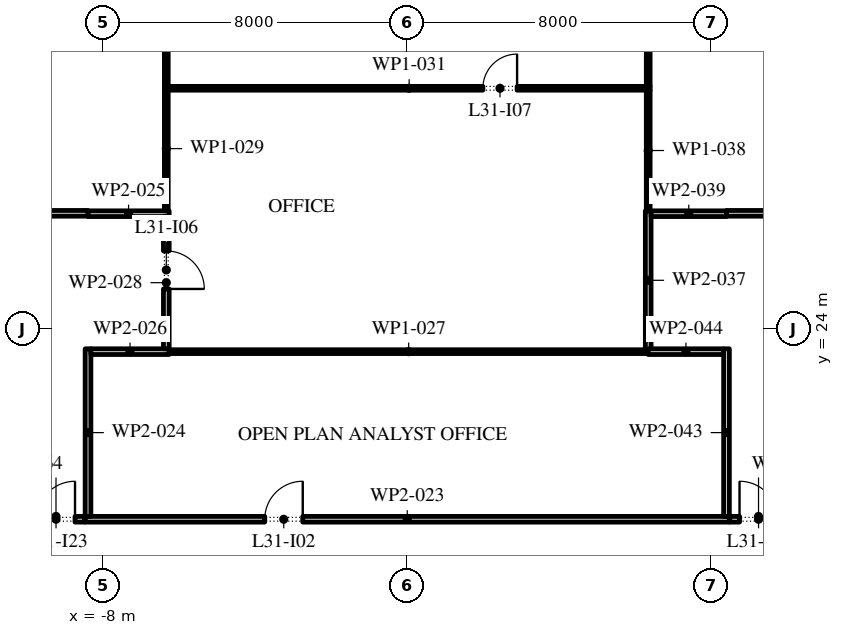
"""IFC4 building model, lengths in metres.
Left out: names, types, materials, properties, quantities, classifications, styles, units other than length and angle.
Written with IfcOpenShell. Run it as: python <this file> out.ifc"""

import sys

from ifc_helpers import new_model, si_unit, direction, frame, frame_2d, origin, place, context, subcontext, project, spatial, rectangle, extrude, element, fill, save


model = new_model("IFC4")
c1 = context("Model", 3, precision=1e-05, world=origin(), true_north=direction((0.0, 1.0)))
c2 = subcontext(c1, "Body", "Model", "MODEL_VIEW")
j1 = project(units=[si_unit("LENGTHUNIT", "METRE"), si_unit("PLANEANGLEUNIT", "RADIAN")], contexts=[c1])
p1 = place(None, origin())
s1 = spatial("IfcSite", under=j1, at=p1, CompositionType="ELEMENT")
p2 = place(p1, origin())
s2 = spatial("IfcBuilding", under=s1, at=p2, CompositionType="ELEMENT")
p3 = place(p2, frame((0.0, 0.0, 143.4)))
s3 = spatial("IfcBuildingStorey", under=s2, at=p3, CompositionType="ELEMENT", Elevation=143.4)
p4 = place(p3, frame((31.078, 28.421, 0.0), z_axis=(0.0, 0.0, 1.0), x_axis=(-0.974370456532, 0.224949357493, 0.0)))
e1 = element("IfcWall", 1, at=p4, inside=s3, PredefinedType="STANDARD", context=c2, shape_type="SweptSolid", body=[
    extrude(rectangle(XDim=51.0, YDim=0.3, at=frame_2d((25.5, 0.0))), origin(), (0.0, 0.0, 1.0), 4.0),
])
p5 = place(p4, frame((1.875, 0.0, 0.45)))
e2 = element("IfcOpeningElement", 2, at=p5, cuts=e1, PredefinedType="OPENING", context=c2, shape_type="SweptSolid", body=[
    extrude(rectangle(XDim=4.5, YDim=2.875, at=frame_2d((2.25, 1.438))), frame((0.0, 0.16, 0.0), z_axis=(0.0, -1.0, 0.0), x_axis=(1.0, 0.0, 0.0)), (0.0, 0.0, 1.0), 0.32),
])
p6 = place(p4, frame((10.275, 0.0, 0.45)))
e3 = element("IfcOpeningElement", 3, at=p6, cuts=e1, PredefinedType="OPENING", context=c2, shape_type="SweptSolid", body=[
    extrude(rectangle(XDim=4.5, YDim=2.8, at=frame_2d((2.25, 1.4))), frame((0.0, 0.16, 0.0), z_axis=(0.0, -1.0, 0.0), x_axis=(1.0, 0.0, 0.0)), (0.0, 0.0, 1.0), 0.32),
])
p7 = place(p4, frame((18.825, 0.0, 0.45)))
e4 = element("IfcOpeningElement", 4, at=p7, cuts=e1, PredefinedType="OPENING", context=c2, shape_type="SweptSolid", body=[
    extrude(rectangle(XDim=4.5, YDim=2.75, at=frame_2d((2.25, 1.375))), frame((0.0, 0.16, 0.0), z_axis=(0.0, -1.0, 0.0), x_axis=(1.0, 0.0, 0.0)), (0.0, 0.0, 1.0), 0.32),
])
p8 = place(p4, frame((28.425, 0.0, 0.0)))
e5 = element("IfcOpeningElement", 5, at=p8, cuts=e1, PredefinedType="OPENING", context=c2, shape_type="SweptSolid", body=[
    extrude(rectangle(XDim=2.4, YDim=3.025, at=frame_2d((1.2, 1.512))), frame((0.0, 0.16, 0.0), z_axis=(0.0, -1.0, 0.0), x_axis=(1.0, 0.0, 0.0)), (0.0, 0.0, 1.0), 0.32),
])
p9 = place(p4, frame((35.925, 0.0, 0.45)))
e6 = element("IfcOpeningElement", 6, at=p9, cuts=e1, PredefinedType="OPENING", context=c2, shape_type="SweptSolid", body=[
    extrude(rectangle(XDim=4.5, YDim=2.525, at=frame_2d((2.25, 1.262))), frame((0.0, 0.16, 0.0), z_axis=(0.0, -1.0, 0.0), x_axis=(1.0, 0.0, 0.0)), (0.0, 0.0, 1.0), 0.32),
])
p10 = place(p4, frame((44.475, 0.0, 0.45)))
e7 = element("IfcOpeningElement", 7, at=p10, cuts=e1, PredefinedType="OPENING", context=c2, shape_type="SweptSolid", body=[
    extrude(rectangle(XDim=4.5, YDim=2.45, at=frame_2d((2.25, 1.225))), frame((0.0, 0.16, 0.0), z_axis=(0.0, -1.0, 0.0), x_axis=(1.0, 0.0, 0.0)), (0.0, 0.0, 1.0), 0.32),
])
p11 = place(p3, frame((-18.65, 27.05, 0.0), z_axis=(0.0, 0.0, 1.0), x_axis=(1.0, 0.0, 0.0)))
e8 = element("IfcWall", 8, at=p11, inside=s3, PredefinedType="PARTITIONING", context=c2, shape_type="SweptSolid", body=[
    extrude(rectangle(XDim=10.25, YDim=0.15, at=frame_2d((5.125, 0.0))), origin(), (0.0, 0.0, 1.0), 4.0),
])
p12 = place(p11, frame((3.6, 0.0, 0.0)))
e9 = element("IfcOpeningElement", 9, at=p12, cuts=e8, PredefinedType="OPENING", context=c2, shape_type="SweptSolid", body=[
    extrude(rectangle(XDim=1.0, YDim=2.1, at=frame_2d((0.5, 1.05))), frame((0.0, 0.085, 0.0), z_axis=(0.0, -1.0, 0.0), x_axis=(1.0, 0.0, 0.0)), (0.0, 0.0, 1.0), 0.17),
])
p13 = place(p3, frame((-8.475, 19.0, 0.0), z_axis=(0.0, 0.0, 1.0), x_axis=(1.0, 0.0, 0.0)))
e10 = element("IfcWall", 10, at=p13, inside=s3, PredefinedType="PARTITIONING", context=c2, shape_type="SweptSolid", body=[
    extrude(rectangle(XDim=16.95, YDim=0.15, at=frame_2d((8.475, 0.0))), origin(), (0.0, 0.0, 1.0), 4.0),
])
p14 = place(p13, frame((4.725, 0.0, 0.0)))
e11 = element("IfcOpeningElement", 11, at=p14, cuts=e10, PredefinedType="OPENING", context=c2, shape_type="SweptSolid", body=[
    extrude(rectangle(XDim=1.0, YDim=2.1, at=frame_2d((0.5, 1.05))), frame((0.0, 0.085, 0.0), z_axis=(0.0, -1.0, 0.0), x_axis=(1.0, 0.0, 0.0)), (0.0, 0.0, 1.0), 0.17),
])
p15 = place(p3, frame((-8.4, 23.485, 0.0), z_axis=(0.0, 0.0, 1.0), x_axis=(0.0, -1.0, 0.0)))
e12 = element("IfcWall", 12, at=p15, inside=s3, PredefinedType="PARTITIONING", context=c2, shape_type="SweptSolid", body=[
    extrude(rectangle(XDim=4.41, YDim=0.15, at=frame_2d((2.205, 0.0))), origin(), (0.0, 0.0, 1.0), 4.0),
])
p16 = place(p3, frame((-8.4, 27.04, 0.0), z_axis=(0.0, 0.0, 1.0), x_axis=(1.0, 0.0, 0.0)))
e13 = element("IfcWall", 13, at=p16, inside=s3, PredefinedType="PARTITIONING", context=c2, shape_type="SweptSolid", body=[
    extrude(rectangle(XDim=2.135, YDim=0.15, at=frame_2d((1.067, 0.0))), origin(), (0.0, 0.0, 1.0), 4.0),
])
p17 = place(p3, frame((-6.265, 23.41, 0.0), z_axis=(0.0, 0.0, 1.0), x_axis=(-1.0, 0.0, 0.0)))
e14 = element("IfcWall", 14, at=p17, inside=s3, PredefinedType="PARTITIONING", context=c2, shape_type="SweptSolid", body=[
    extrude(rectangle(XDim=2.06, YDim=0.15, at=frame_2d((1.03, 0.0))), origin(), (0.0, 0.0, 1.0), 4.0),
])
p18 = place(p3, frame((-6.265, 23.41, 0.0), z_axis=(0.0, 0.0, 1.0), x_axis=(1.0, 0.0, 0.0)))
e15 = element("IfcWall", 15, at=p18, inside=s3, PredefinedType="PARTITIONING", context=c2, shape_type="SweptSolid", body=[
    extrude(rectangle(XDim=12.605, YDim=0.1, at=frame_2d((6.302, 0.0))), origin(), (0.0, 0.0, 1.0), 4.0),
])
p19 = place(p3, frame((-6.34, 26.965, 0.0), z_axis=(0.0, 0.0, 1.0), x_axis=(0.0, -1.0, 0.0)))
e16 = element("IfcWall", 16, at=p19, inside=s3, PredefinedType="PARTITIONING", context=c2, shape_type="SweptSolid", body=[
    extrude(rectangle(XDim=3.48, YDim=0.15, at=frame_2d((1.74, 0.0))), origin(), (0.0, 0.0, 1.0), 4.0),
])
p20 = place(p19, frame((0.905, 0.0, 0.0)))
e17 = element("IfcOpeningElement", 17, at=p20, cuts=e16, PredefinedType="OPENING", context=c2, shape_type="SweptSolid", body=[
    extrude(rectangle(XDim=1.0, YDim=2.1, at=frame_2d((0.5, 1.05))), frame((0.0, 0.085, 0.0), z_axis=(0.0, -1.0, 0.0), x_axis=(1.0, 0.0, 0.0)), (0.0, 0.0, 1.0), 0.17),
])
p21 = place(p3, frame((-6.34, 27.115, 0.0), z_axis=(0.0, 0.0, 1.0), x_axis=(0.0, 1.0, 0.0)))
e18 = element("IfcWall", 18, at=p21, inside=s3, PredefinedType="PARTITIONING", context=c2, shape_type="SweptSolid", body=[
    extrude(rectangle(XDim=3.275, YDim=0.1, at=frame_2d((1.637, 0.0))), origin(), (0.0, 0.0, 1.0), 4.0),
])
p22 = place(p3, frame((-6.34, 30.39, 0.0), z_axis=(0.0, 0.0, 1.0), x_axis=(0.0, 1.0, 0.0)))
e19 = element("IfcWall", 19, at=p22, inside=s3, PredefinedType="PARTITIONING", context=c2, shape_type="SweptSolid", body=[
    extrude(rectangle(XDim=3.06, YDim=0.1, at=frame_2d((1.53, 0.0))), origin(), (0.0, 0.0, 1.0), 4.0),
])
p23 = place(p3, frame((-6.29, 30.34, 0.0), z_axis=(0.0, 0.0, 1.0), x_axis=(1.0, 0.0, 0.0)))
e20 = element("IfcWall", 20, at=p23, inside=s3, PredefinedType="PARTITIONING", context=c2, shape_type="SweptSolid", body=[
    extrude(rectangle(XDim=12.68, YDim=0.1, at=frame_2d((6.34, 0.0))), origin(), (0.0, 0.0, 1.0), 4.0),
])
p24 = place(p23, frame((8.28, 0.0, 0.0)))
e21 = element("IfcOpeningElement", 21, at=p24, cuts=e20, PredefinedType="OPENING", context=c2, shape_type="SweptSolid", body=[
    extrude(rectangle(XDim=0.9, YDim=2.1, at=frame_2d((0.45, 1.05))), frame((0.0, 0.06, 0.0), z_axis=(0.0, -1.0, 0.0), x_axis=(1.0, 0.0, 0.0)), (0.0, 0.0, 1.0), 0.12),
])
p25 = place(p3, frame((6.34, 23.46, 0.0), z_axis=(0.0, 0.0, 1.0), x_axis=(0.0, 1.0, 0.0)))
e22 = element("IfcWall", 22, at=p25, inside=s3, PredefinedType="PARTITIONING", context=c2, shape_type="SweptSolid", body=[
    extrude(rectangle(XDim=3.655, YDim=0.15, at=frame_2d((1.828, 0.0))), origin(), (0.0, 0.0, 1.0), 4.0),
])
p26 = place(p3, frame((6.34, 27.115, 0.0), z_axis=(0.0, 0.0, 1.0), x_axis=(0.0, 1.0, 0.0)))
e23 = element("IfcWall", 23, at=p26, inside=s3, PredefinedType="PARTITIONING", context=c2, shape_type="SweptSolid", body=[
    extrude(rectangle(XDim=3.175, YDim=0.1, at=frame_2d((1.587, 0.0))), origin(), (0.0, 0.0, 1.0), 4.0),
])
p27 = place(p3, frame((6.415, 27.04, 0.0), z_axis=(0.0, 0.0, 1.0), x_axis=(1.0, 0.0, 0.0)))
e24 = element("IfcWall", 24, at=p27, inside=s3, PredefinedType="PARTITIONING", context=c2, shape_type="SweptSolid", body=[
    extrude(rectangle(XDim=1.985, YDim=0.15, at=frame_2d((0.992, 0.0))), origin(), (0.0, 0.0, 1.0), 4.0),
])
p28 = place(p3, frame((6.34, 30.39, 0.0), z_axis=(0.0, 0.0, 1.0), x_axis=(0.0, 1.0, 0.0)))
e25 = element("IfcWall", 25, at=p28, inside=s3, PredefinedType="PARTITIONING", context=c2, shape_type="SweptSolid", body=[
    extrude(rectangle(XDim=3.671, YDim=0.1, at=frame_2d((1.835, 0.0))), origin(), (0.0, 0.0, 1.0), 4.0),
])
p29 = place(p3, frame((8.4, 19.075, 0.0), z_axis=(0.0, 0.0, 1.0), x_axis=(0.0, 1.0, 0.0)))
e26 = element("IfcWall", 26, at=p29, inside=s3, PredefinedType="PARTITIONING", context=c2, shape_type="SweptSolid", body=[
    extrude(rectangle(XDim=4.41, YDim=0.15, at=frame_2d((2.205, 0.0))), origin(), (0.0, 0.0, 1.0), 4.0),
])
p30 = place(p3, frame((8.325, 23.41, 0.0), z_axis=(0.0, 0.0, 1.0), x_axis=(-1.0, 0.0, 0.0)))
e27 = element("IfcWall", 27, at=p30, inside=s3, PredefinedType="PARTITIONING", context=c2, shape_type="SweptSolid", body=[
    extrude(rectangle(XDim=1.985, YDim=0.15, at=frame_2d((0.992, 0.0))), origin(), (0.0, 0.0, 1.0), 4.0),
])
p31 = place(p3, frame((8.4, 27.05, 0.0), z_axis=(0.0, 0.0, 1.0), x_axis=(1.0, 0.0, 0.0)))
e28 = element("IfcWall", 28, at=p31, inside=s3, PredefinedType="PARTITIONING", context=c2, shape_type="SweptSolid", body=[
    extrude(rectangle(XDim=10.3, YDim=0.15, at=frame_2d((5.15, 0.0))), origin(), (0.0, 0.0, 1.0), 4.0),
])
p32 = place(p31, frame((6.6, 0.0, 0.0)))
e29 = element("IfcOpeningElement", 29, at=p32, cuts=e28, PredefinedType="OPENING", context=c2, shape_type="SweptSolid", body=[
    extrude(rectangle(XDim=1.0, YDim=2.1, at=frame_2d((0.5, 1.05))), frame((0.0, 0.085, 0.0), z_axis=(0.0, -1.0, 0.0), x_axis=(1.0, 0.0, 0.0)), (0.0, 0.0, 1.0), 0.17),
])
p33 = place(p3, frame((-10.0, 19.0, 0.0), z_axis=(0.0, 0.0, 1.0), x_axis=(1.0, 0.0, 0.0)))
e30 = element("IfcWall", 30, at=p33, inside=s3, PredefinedType="PARTITIONING", context=c2, shape_type="SweptSolid", body=[
    extrude(rectangle(XDim=1.515, YDim=0.15, at=frame_2d((0.757, 0.0))), origin(), (0.0, 0.0, 1.0), 4.0),
])
p34 = place(p33, frame((0.258, 0.0, 0.0)))
e31 = element("IfcOpeningElement", 31, at=p34, cuts=e30, PredefinedType="OPENING", context=c2, shape_type="SweptSolid", body=[
    extrude(rectangle(XDim=1.0, YDim=2.1, at=frame_2d((0.5, 1.05))), frame((0.0, 0.085, 0.0), z_axis=(0.0, -1.0, 0.0), x_axis=(1.0, 0.0, 0.0)), (0.0, 0.0, 1.0), 0.17),
])
p35 = place(p3, frame((8.485, 19.0, 0.0), z_axis=(0.0, 0.0, 1.0), x_axis=(1.0, 0.0, 0.0)))
e32 = element("IfcWall", 32, at=p35, inside=s3, PredefinedType="PARTITIONING", context=c2, shape_type="SweptSolid", body=[
    extrude(rectangle(XDim=1.515, YDim=0.15, at=frame_2d((0.757, 0.0))), origin(), (0.0, 0.0, 1.0), 4.0),
])
p36 = place(p35, frame((0.258, 0.0, 0.0)))
e33 = element("IfcOpeningElement", 33, at=p36, cuts=e32, PredefinedType="OPENING", context=c2, shape_type="SweptSolid", body=[
    extrude(rectangle(XDim=1.0, YDim=2.1, at=frame_2d((0.5, 1.05))), frame((0.0, 0.085, 0.0), z_axis=(0.0, -1.0, 0.0), x_axis=(1.0, 0.0, 0.0)), (0.0, 0.0, 1.0), 0.17),
])
p37 = place(p14, origin())
e34 = element("IfcDoor", 34, at=p37, inside=s3, OperationType="SINGLE_SWING_LEFT", PredefinedType="DOOR", context=c2, shape_type="SweptSolid", body=[
    extrude(rectangle(XDim=1.0, YDim=2.1, at=frame_2d((0.5, 1.05))), frame((0.0, 0.025, 0.0), z_axis=(0.0, -1.0, 0.0), x_axis=(1.0, 0.0, 0.0)), (0.0, 0.0, 1.0), 0.05),
])
fill(e11, e34)
p38 = place(p20, origin())
e35 = element("IfcDoor", 35, at=p38, inside=s3, OperationType="SINGLE_SWING_LEFT", PredefinedType="DOOR", context=c2, shape_type="SweptSolid", body=[
    extrude(rectangle(XDim=1.0, YDim=2.1, at=frame_2d((0.5, 1.05))), frame((0.0, 0.025, 0.0), z_axis=(0.0, -1.0, 0.0), x_axis=(1.0, 0.0, 0.0)), (0.0, 0.0, 1.0), 0.05),
])
fill(e17, e35)
p39 = place(p24, origin())
e36 = element("IfcDoor", 36, at=p39, inside=s3, OperationType="SINGLE_SWING_LEFT", PredefinedType="DOOR", context=c2, shape_type="SweptSolid", body=[
    extrude(rectangle(XDim=0.9, YDim=2.1, at=frame_2d((0.45, 1.05))), frame((0.0, 0.025, 0.0), z_axis=(0.0, -1.0, 0.0), x_axis=(1.0, 0.0, 0.0)), (0.0, 0.0, 1.0), 0.05),
])
fill(e21, e36)
p40 = place(p34, origin())
e37 = element("IfcDoor", 37, at=p40, inside=s3, OperationType="SINGLE_SWING_LEFT", PredefinedType="DOOR", context=c2, shape_type="SweptSolid", body=[
    extrude(rectangle(XDim=1.0, YDim=2.1, at=frame_2d((0.5, 1.05))), frame((0.0, 0.025, 0.0), z_axis=(0.0, -1.0, 0.0), x_axis=(1.0, 0.0, 0.0)), (0.0, 0.0, 1.0), 0.05),
])
fill(e31, e37)
p41 = place(p36, origin())
e38 = element("IfcDoor", 38, at=p41, inside=s3, OperationType="SINGLE_SWING_RIGHT", PredefinedType="DOOR", context=c2, shape_type="SweptSolid", body=[
    extrude(rectangle(XDim=1.0, YDim=2.1, at=frame_2d((0.5, 1.05))), frame((0.0, 0.025, 0.0), z_axis=(0.0, -1.0, 0.0), x_axis=(1.0, 0.0, 0.0)), (0.0, 0.0, 1.0), 0.05),
])
fill(e33, e38)
save(model, sys.argv[1])
